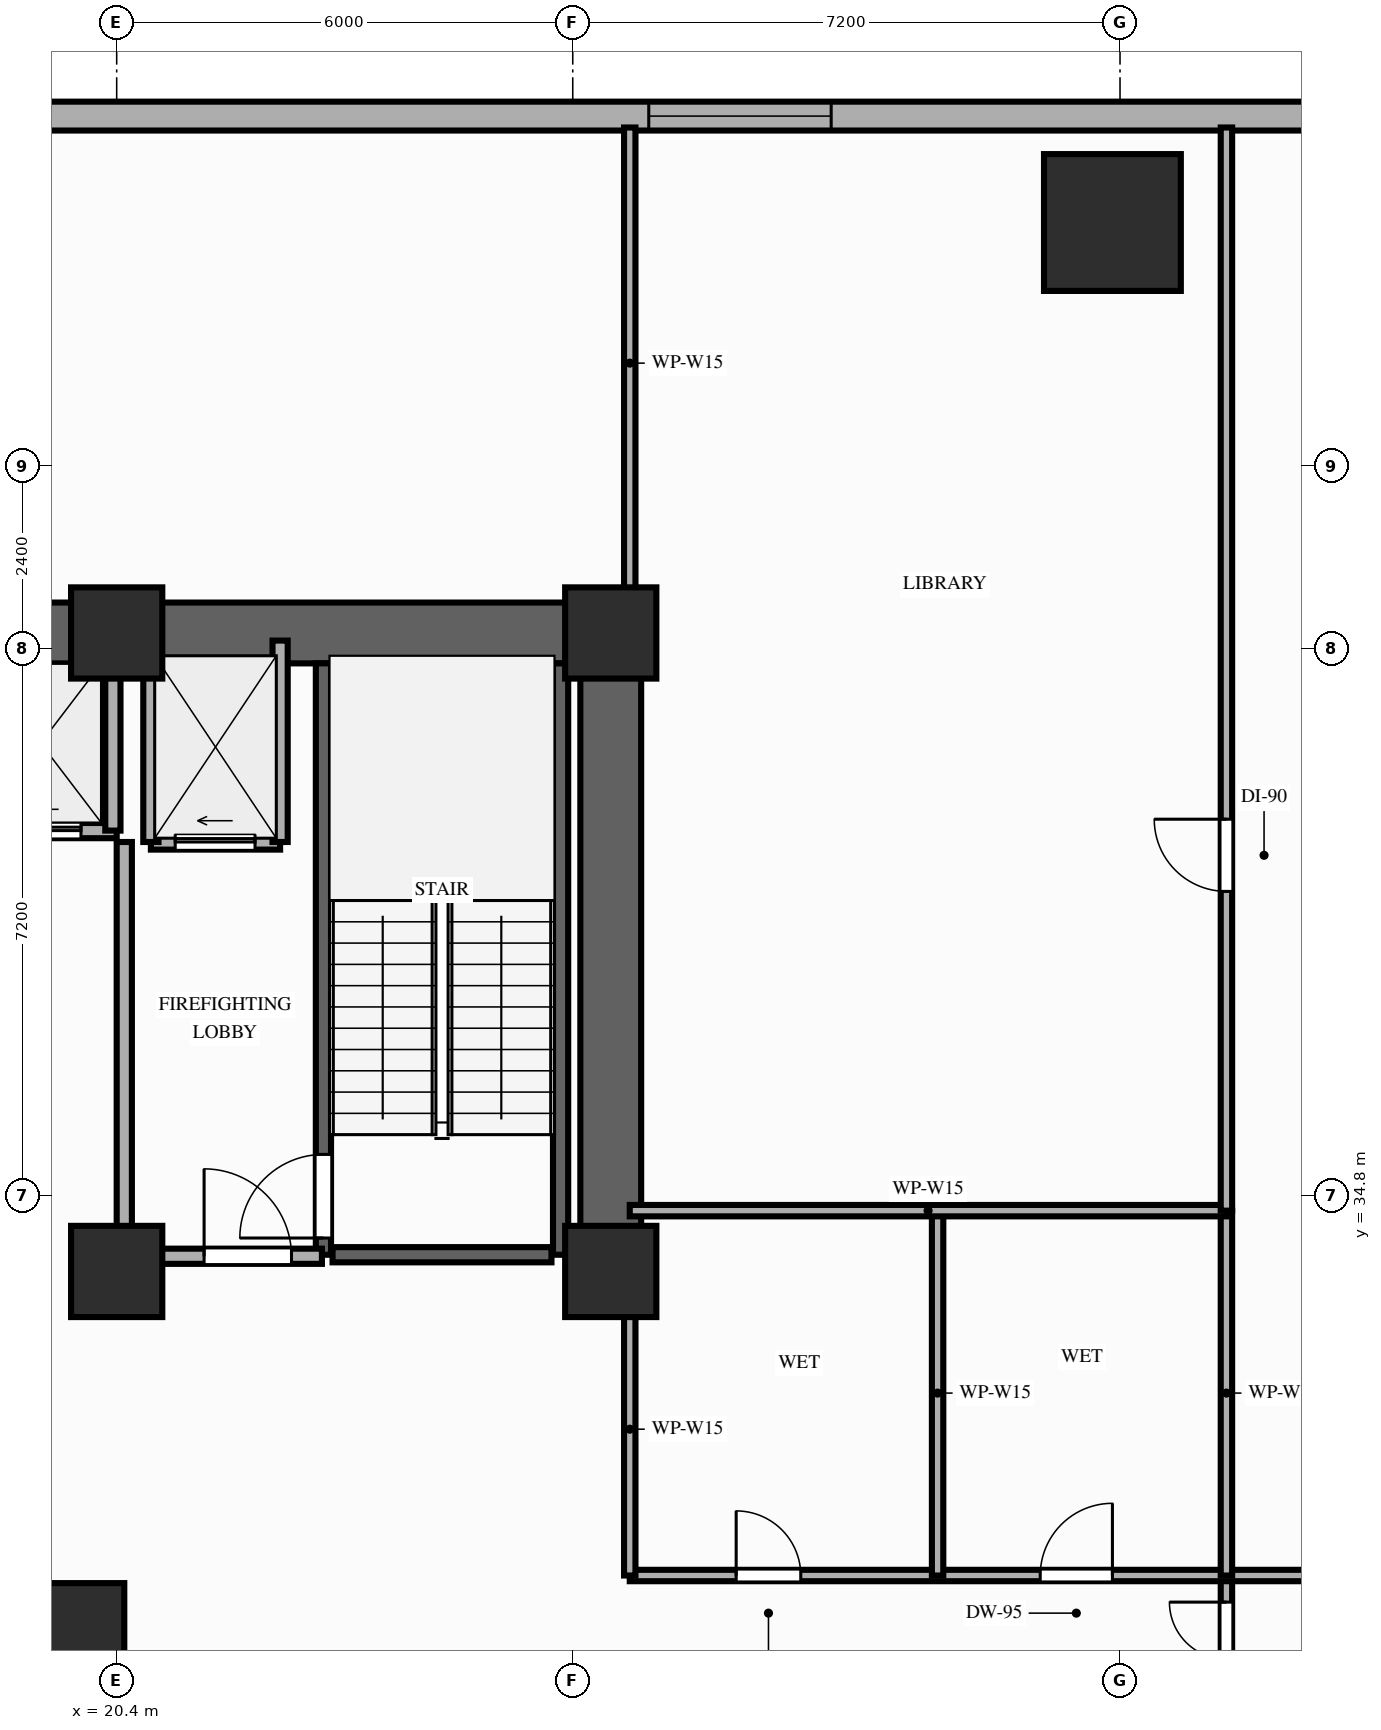
"""IFC4 building model, lengths in metres.
Left out: names, types, materials, properties, quantities, classifications, styles, units other than length and angle.
Written with IfcOpenShell. Run it as: python <this file> out.ifc"""

import sys

from ifc_helpers import new_model, si_unit, direction, frame, frame_2d, origin, origin_2d, place, context, subcontext, project, spatial, rectangle, extrude, element, fill, save


model = new_model("IFC4")
c1 = context("Model", 3, precision=1e-05, world=origin(), true_north=direction((0.0, 1.0)))
c2 = subcontext(c1, "Body", "Model", "MODEL_VIEW")
j1 = project(units=[si_unit("LENGTHUNIT", "METRE"), si_unit("PLANEANGLEUNIT", "RADIAN")], contexts=[c1])
p1 = place(None, origin())
s1 = spatial("IfcSite", under=j1, at=p1, CompositionType="ELEMENT")
p2 = place(p1, origin())
s2 = spatial("IfcBuilding", under=s1, at=p2, CompositionType="ELEMENT")
p3 = place(p2, frame((0.0, 0.0, 4.6)))
s3 = spatial("IfcBuildingStorey", under=s2, at=p3, CompositionType="ELEMENT", Elevation=4.6)
for number, where, z_axis, x_axis in (
    (1, (20.4, 33.8, 0.0), (0.0, 0.0, 1.0), (1.0, 0.0, 0.0)),
    (2, (26.9, 33.8, 0.0), (0.0, 0.0, 1.0), (1.0, 0.0, 0.0)),
    (3, (20.4, 42.2, 0.0), (0.0, 0.0, 1.0), (1.0, 0.0, 0.0)),
    (4, (26.9, 42.2, 0.0), (0.0, 0.0, 1.0), (1.0, 0.0, 0.0)),
):
    element("IfcColumn", number, at=place(p3, frame(where, z_axis=z_axis, x_axis=x_axis)), inside=s3, PredefinedType="COLUMN", context=c2, shape_type="SweptSolid", body=[
        extrude(rectangle(XDim=1.2, YDim=1.2, at=origin_2d()), origin(), (0.0, 0.0, 1.0), 4.2),
    ])
for number, where, z_axis, x_axis in (
    (5, (19.6, 28.8, 0.0), (0.0, 0.0, 1.0), (1.0, 0.0, 0.0)),
    (6, (33.5, 47.6, 0.0), (0.0, 0.0, 1.0), (1.0, 0.0, 0.0)),
):
    element("IfcColumn", number, at=place(p3, frame(where, z_axis=z_axis, x_axis=x_axis)), inside=s3, PredefinedType="COLUMN", context=c2, shape_type="SweptSolid", body=[
        extrude(rectangle(XDim=1.8, YDim=1.8, at=origin_2d()), origin(), (0.0, 0.0, 1.0), 4.2),
    ])
p4 = place(p3, frame((73.2, 49.0, 0.0), z_axis=(0.0, 0.0, 1.0), x_axis=(-1.0, 0.0, 0.0)))
e7 = element("IfcWall", 7, at=p4, inside=s3, PredefinedType="STANDARD", context=c2, shape_type="SweptSolid", body=[
    extrude(rectangle(XDim=69.6, YDim=0.38, at=frame_2d((34.8, 0.0))), origin(), (0.0, 0.0, 1.0), 3.95),
])
p5 = place(p4, frame((3.4, 0.0, 0.9)))
e8 = element("IfcOpeningElement", 8, at=p5, cuts=e7, PredefinedType="OPENING", context=c2, shape_type="SweptSolid", body=[
    extrude(rectangle(XDim=2.4, YDim=2.15, at=frame_2d((1.2, 1.075))), frame((0.0, 0.2, 0.0), z_axis=(0.0, -1.0, 0.0), x_axis=(1.0, 0.0, 0.0)), (0.0, 0.0, 1.0), 0.4),
])
p6 = place(p4, frame((19.2, 0.0, 0.9)))
e9 = element("IfcOpeningElement", 9, at=p6, cuts=e7, PredefinedType="OPENING", context=c2, shape_type="SweptSolid", body=[
    extrude(rectangle(XDim=2.4, YDim=2.15, at=frame_2d((1.2, 1.075))), frame((0.0, 0.2, 0.0), z_axis=(0.0, -1.0, 0.0), x_axis=(1.0, 0.0, 0.0)), (0.0, 0.0, 1.0), 0.4),
])
p7 = place(p4, frame((31.2, 0.0, 0.9)))
e10 = element("IfcOpeningElement", 10, at=p7, cuts=e7, PredefinedType="OPENING", context=c2, shape_type="SweptSolid", body=[
    extrude(rectangle(XDim=2.4, YDim=2.15, at=frame_2d((1.2, 1.075))), frame((0.0, 0.2, 0.0), z_axis=(0.0, -1.0, 0.0), x_axis=(1.0, 0.0, 0.0)), (0.0, 0.0, 1.0), 0.4),
])
p8 = place(p4, frame((43.4, 0.0, 0.9)))
e11 = element("IfcOpeningElement", 11, at=p8, cuts=e7, PredefinedType="OPENING", context=c2, shape_type="SweptSolid", body=[
    extrude(rectangle(XDim=2.4, YDim=2.15, at=frame_2d((1.2, 1.075))), frame((0.0, 0.2, 0.0), z_axis=(0.0, -1.0, 0.0), x_axis=(1.0, 0.0, 0.0)), (0.0, 0.0, 1.0), 0.4),
])
p9 = place(p4, frame((55.6, 0.0, 0.9)))
e12 = element("IfcOpeningElement", 12, at=p9, cuts=e7, PredefinedType="OPENING", context=c2, shape_type="SweptSolid", body=[
    extrude(rectangle(XDim=2.4, YDim=2.15, at=frame_2d((1.2, 1.075))), frame((0.0, 0.2, 0.0), z_axis=(0.0, -1.0, 0.0), x_axis=(1.0, 0.0, 0.0)), (0.0, 0.0, 1.0), 0.4),
])
p10 = place(p3, frame((6.45, 42.2, 0.0), z_axis=(0.0, 0.0, 1.0), x_axis=(1.0, 0.0, 0.0)))
e13 = element("IfcWall", 13, at=p10, inside=s3, PredefinedType="SHEAR", context=c2, shape_type="SweptSolid", body=[
    extrude(rectangle(XDim=20.45, YDim=0.8, at=frame_2d((10.225, 0.0))), origin(), (0.0, 0.0, 1.0), 3.95),
])
p11 = place(p3, frame((26.9, 33.8, 0.0), z_axis=(0.0, 0.0, 1.0), x_axis=(0.0, 1.0, 0.0)))
e14 = element("IfcWall", 14, at=p11, inside=s3, PredefinedType="SHEAR", context=c2, shape_type="SweptSolid", body=[
    extrude(rectangle(XDim=7.95, YDim=0.8, at=frame_2d((3.975, 0.0))), origin(), (0.0, 0.0, 1.0), 3.95),
])
p12 = place(p3, frame((23.12, 34.02, 0.0), z_axis=(0.0, 0.0, 1.0), x_axis=(0.0, 1.0, 0.0)))
e15 = element("IfcWall", 15, at=p12, inside=s3, PredefinedType="SHEAR", context=c2, shape_type="SweptSolid", body=[
    extrude(rectangle(XDim=7.78, YDim=0.2, at=frame_2d((3.89, 0.0))), origin(), (0.0, 0.0, 1.0), 3.95),
])
p13 = place(p12, frame((0.22, 0.0, 0.0)))
e16 = element("IfcOpeningElement", 16, at=p13, cuts=e15, PredefinedType="OPENING", context=c2, shape_type="SweptSolid", body=[
    extrude(rectangle(XDim=1.1, YDim=2.15, at=frame_2d((0.55, 1.075))), frame((0.0, 0.11, 0.0), z_axis=(0.0, -1.0, 0.0), x_axis=(1.0, 0.0, 0.0)), (0.0, 0.0, 1.0), 0.22),
])
p14 = place(p3, frame((26.24, 34.02, 0.0), z_axis=(0.0, 0.0, 1.0), x_axis=(0.0, 1.0, 0.0)))
e17 = element("IfcWall", 17, at=p14, inside=s3, PredefinedType="SHEAR", context=c2, shape_type="SweptSolid", body=[
    extrude(rectangle(XDim=7.78, YDim=0.2, at=frame_2d((3.89, 0.0))), origin(), (0.0, 0.0, 1.0), 3.95),
])
p15 = place(p3, frame((23.24, 34.02, 0.0), z_axis=(0.0, 0.0, 1.0), x_axis=(1.0, 0.0, 0.0)))
e18 = element("IfcWall", 18, at=p15, inside=s3, PredefinedType="SHEAR", context=c2, shape_type="SweptSolid", body=[
    extrude(rectangle(XDim=2.88, YDim=0.2, at=frame_2d((1.44, 0.0))), origin(), (0.0, 0.0, 1.0), 3.95),
])
p16 = place(p3, frame((20.85, 39.45, 0.0), z_axis=(0.0, 0.0, 1.0), x_axis=(1.0, 0.0, 0.0)))
e19 = element("IfcWall", 19, at=p16, inside=s3, PredefinedType="MOVABLE", context=c2, shape_type="SweptSolid", body=[
    extrude(rectangle(XDim=1.7, YDim=0.2, at=frame_2d((0.85, 0.0))), origin(), (0.0, 0.0, 1.0), 3.95),
])
p17 = place(p16, frame((0.32, 0.0, 0.0)))
e20 = element("IfcOpeningElement", 20, at=p17, cuts=e19, PredefinedType="OPENING", context=c2, shape_type="SweptSolid", body=[
    extrude(rectangle(XDim=1.05, YDim=2.15, at=frame_2d((0.525, 1.075))), frame((0.0, 0.11, 0.0), z_axis=(0.0, -1.0, 0.0), x_axis=(1.0, 0.0, 0.0)), (0.0, 0.0, 1.0), 0.22),
])
for number, where, z_axis, x_axis in (
    (21, (20.85, 39.45, 0.0), (0.0, 0.0, 1.0), (0.0, 1.0, 0.0)),
    (22, (22.55, 39.45, 0.0), (0.0, 0.0, 1.0), (0.0, 1.0, 0.0)),
):
    element("IfcWall", number, at=place(p3, frame(where, z_axis=z_axis, x_axis=x_axis)), inside=s3, PredefinedType="MOVABLE", context=c2, shape_type="SweptSolid", body=[
        extrude(rectangle(XDim=2.65, YDim=0.2, at=frame_2d((1.325, 0.0))), origin(), (0.0, 0.0, 1.0), 3.95),
    ])
p18 = place(p3, frame((20.5, 34.0, 0.0), z_axis=(0.0, 0.0, 1.0), x_axis=(0.0, 1.0, 0.0)))
e23 = element("IfcWall", 23, at=p18, inside=s3, PredefinedType="PARTITIONING", context=c2, shape_type="SweptSolid", body=[
    extrude(rectangle(XDim=5.45, YDim=0.2, at=frame_2d((2.725, 0.0))), origin(), (0.0, 0.0, 1.0), 3.23),
])
p19 = place(p3, frame((20.5, 34.0, 0.0), z_axis=(0.0, 0.0, 1.0), x_axis=(1.0, 0.0, 0.0)))
e24 = element("IfcWall", 24, at=p19, inside=s3, PredefinedType="PARTITIONING", context=c2, shape_type="SweptSolid", body=[
    extrude(rectangle(XDim=2.6, YDim=0.2, at=frame_2d((1.3, 0.0))), origin(), (0.0, 0.0, 1.0), 3.23),
])
p20 = place(p19, frame((1.05, 0.0, 0.0)))
e25 = element("IfcOpeningElement", 25, at=p20, cuts=e24, PredefinedType="OPENING", context=c2, shape_type="SweptSolid", body=[
    extrude(rectangle(XDim=1.15, YDim=2.15, at=frame_2d((0.575, 1.075))), frame((0.0, 0.11, 0.0), z_axis=(0.0, -1.0, 0.0), x_axis=(1.0, 0.0, 0.0)), (0.0, 0.0, 1.0), 0.22),
])
p21 = place(p3, frame((13.0, 39.6, 0.0), z_axis=(0.0, 0.0, 1.0), x_axis=(1.0, 0.0, 0.0)))
e26 = element("IfcWall", 26, at=p21, inside=s3, PredefinedType="MOVABLE", context=c2, shape_type="SweptSolid", body=[
    extrude(rectangle(XDim=7.4, YDim=0.2, at=frame_2d((3.7, 0.0))), origin(), (0.0, 0.0, 1.0), 3.95),
])
p22 = place(p21, frame((0.47, 0.0, 0.0)))
e27 = element("IfcOpeningElement", 27, at=p22, cuts=e26, PredefinedType="OPENING", context=c2, shape_type="SweptSolid", body=[
    extrude(rectangle(XDim=1.05, YDim=2.15, at=frame_2d((0.525, 1.075))), frame((0.0, 0.11, 0.0), z_axis=(0.0, -1.0, 0.0), x_axis=(1.0, 0.0, 0.0)), (0.0, 0.0, 1.0), 0.22),
])
p23 = place(p21, frame((2.28, 0.0, 0.0)))
e28 = element("IfcOpeningElement", 28, at=p23, cuts=e26, PredefinedType="OPENING", context=c2, shape_type="SweptSolid", body=[
    extrude(rectangle(XDim=1.05, YDim=2.15, at=frame_2d((0.525, 1.075))), frame((0.0, 0.11, 0.0), z_axis=(0.0, -1.0, 0.0), x_axis=(1.0, 0.0, 0.0)), (0.0, 0.0, 1.0), 0.22),
])
p24 = place(p21, frame((4.08, 0.0, 0.0)))
e29 = element("IfcOpeningElement", 29, at=p24, cuts=e26, PredefinedType="OPENING", context=c2, shape_type="SweptSolid", body=[
    extrude(rectangle(XDim=1.05, YDim=2.15, at=frame_2d((0.525, 1.075))), frame((0.0, 0.11, 0.0), z_axis=(0.0, -1.0, 0.0), x_axis=(1.0, 0.0, 0.0)), (0.0, 0.0, 1.0), 0.22),
])
p25 = place(p21, frame((5.88, 0.0, 0.0)))
e30 = element("IfcOpeningElement", 30, at=p25, cuts=e26, PredefinedType="OPENING", context=c2, shape_type="SweptSolid", body=[
    extrude(rectangle(XDim=1.05, YDim=2.15, at=frame_2d((0.525, 1.075))), frame((0.0, 0.11, 0.0), z_axis=(0.0, -1.0, 0.0), x_axis=(1.0, 0.0, 0.0)), (0.0, 0.0, 1.0), 0.22),
])
p26 = place(p3, frame((20.35, 39.6, 0.0), z_axis=(0.0, 0.0, 1.0), x_axis=(0.0, 1.0, 0.0)))
e31 = element("IfcWall", 31, at=p26, inside=s3, PredefinedType="MOVABLE", context=c2, shape_type="SweptSolid", body=[
    extrude(rectangle(XDim=2.18, YDim=0.2, at=frame_2d((1.09, 0.0))), origin(), (0.0, 0.0, 1.0), 3.95),
])
p27 = place(p3, frame((35.0, 27.6, 0.0), z_axis=(0.0, 0.0, 1.0), x_axis=(0.0, 1.0, 0.0)))
e32 = element("IfcWall", 32, at=p27, inside=s3, PredefinedType="PARTITIONING", context=c2, shape_type="SweptSolid", body=[
    extrude(rectangle(XDim=2.2, YDim=0.15, at=frame_2d((1.1, 0.0))), origin(), (0.0, 0.0, 1.0), 3.23),
])
p28 = place(p27, frame((0.35, 0.0, 0.0)))
e33 = element("IfcOpeningElement", 33, at=p28, cuts=e32, PredefinedType="OPENING", context=c2, shape_type="SweptSolid", body=[
    extrude(rectangle(XDim=1.5, YDim=2.18, at=frame_2d((0.75, 1.09))), frame((0.0, 0.085, 0.0), z_axis=(0.0, -1.0, 0.0), x_axis=(1.0, 0.0, 0.0)), (0.0, 0.0, 1.0), 0.17),
])
p29 = place(p3, frame((27.15, 29.8, 0.0), z_axis=(0.0, 0.0, 1.0), x_axis=(1.0, 0.0, 0.0)))
e34 = element("IfcWall", 34, at=p29, inside=s3, PredefinedType="PARTITIONING", context=c2, shape_type="SweptSolid", body=[
    extrude(rectangle(XDim=35.25, YDim=0.15, at=frame_2d((17.625, 0.0))), origin(), (0.0, 0.0, 1.0), 3.23),
])
p30 = place(p29, frame((25.0, 0.0, 0.0)))
e35 = element("IfcOpeningElement", 35, at=p30, cuts=e34, PredefinedType="OPENING", context=c2, shape_type="SweptSolid", body=[
    extrude(rectangle(XDim=1.0, YDim=2.15, at=frame_2d((0.5, 1.075))), frame((0.0, 0.085, 0.0), z_axis=(0.0, -1.0, 0.0), x_axis=(1.0, 0.0, 0.0)), (0.0, 0.0, 1.0), 0.17),
])
p31 = place(p29, frame((1.4, 0.0, 0.0)))
e36 = element("IfcOpeningElement", 36, at=p31, cuts=e34, PredefinedType="OPENING", context=c2, shape_type="SweptSolid", body=[
    extrude(rectangle(XDim=0.85, YDim=2.1, at=frame_2d((0.425, 1.05))), frame((0.0, 0.085, 0.0), z_axis=(0.0, -1.0, 0.0), x_axis=(1.0, 0.0, 0.0)), (0.0, 0.0, 1.0), 0.17),
])
p32 = place(p29, frame((5.4, 0.0, 0.0)))
e37 = element("IfcOpeningElement", 37, at=p32, cuts=e34, PredefinedType="OPENING", context=c2, shape_type="SweptSolid", body=[
    extrude(rectangle(XDim=0.95, YDim=2.1, at=frame_2d((0.475, 1.05))), frame((0.0, 0.085, 0.0), z_axis=(0.0, -1.0, 0.0), x_axis=(1.0, 0.0, 0.0)), (0.0, 0.0, 1.0), 0.17),
])
p33 = place(p29, frame((12.6, 0.0, 0.0)))
e38 = element("IfcOpeningElement", 38, at=p33, cuts=e34, PredefinedType="OPENING", context=c2, shape_type="SweptSolid", body=[
    extrude(rectangle(XDim=1.0, YDim=2.15, at=frame_2d((0.5, 1.075))), frame((0.0, 0.085, 0.0), z_axis=(0.0, -1.0, 0.0), x_axis=(1.0, 0.0, 0.0)), (0.0, 0.0, 1.0), 0.17),
])
p34 = place(p3, frame((27.15, 29.8, 0.0), z_axis=(0.0, 0.0, 1.0), x_axis=(0.0, 1.0, 0.0)))
e39 = element("IfcWall", 39, at=p34, inside=s3, PredefinedType="PARTITIONING", context=c2, shape_type="SweptSolid", body=[
    extrude(rectangle(XDim=3.85, YDim=0.15, at=frame_2d((1.925, 0.0))), origin(), (0.0, 0.0, 1.0), 3.23),
])
p35 = place(p3, frame((27.15, 42.65, 0.0), z_axis=(0.0, 0.0, 1.0), x_axis=(0.0, 1.0, 0.0)))
e40 = element("IfcWall", 40, at=p35, inside=s3, PredefinedType="PARTITIONING", context=c2, shape_type="SweptSolid", body=[
    extrude(rectangle(XDim=6.2, YDim=0.15, at=frame_2d((3.1, 0.0))), origin(), (0.0, 0.0, 1.0), 3.95),
])
for number, where, z_axis, x_axis in (
    (41, (31.2, 29.8, 0.0), (0.0, 0.0, 1.0), (0.0, 1.0, 0.0)),
    (42, (35.0, 29.8, 0.0), (0.0, 0.0, 1.0), (0.0, 1.0, 0.0)),
):
    element("IfcWall", number, at=place(p3, frame(where, z_axis=z_axis, x_axis=x_axis)), inside=s3, PredefinedType="PARTITIONING", context=c2, shape_type="SweptSolid", body=[
        extrude(rectangle(XDim=4.8, YDim=0.15, at=frame_2d((2.4, 0.0))), origin(), (0.0, 0.0, 1.0), 3.95),
    ])
p36 = place(p3, frame((27.15, 34.6, 0.0), z_axis=(0.0, 0.0, 1.0), x_axis=(1.0, 0.0, 0.0)))
e43 = element("IfcWall", 43, at=p36, inside=s3, PredefinedType="PARTITIONING", context=c2, shape_type="SweptSolid", body=[
    extrude(rectangle(XDim=7.85, YDim=0.15, at=frame_2d((3.925, 0.0))), origin(), (0.0, 0.0, 1.0), 3.23),
])
p37 = place(p3, frame((35.0, 34.6, 0.0), z_axis=(0.0, 0.0, 1.0), x_axis=(0.0, 1.0, 0.0)))
e44 = element("IfcWall", 44, at=p37, inside=s3, PredefinedType="PARTITIONING", context=c2, shape_type="SweptSolid", body=[
    extrude(rectangle(XDim=14.25, YDim=0.15, at=frame_2d((7.125, 0.0))), origin(), (0.0, 0.0, 1.0), 3.23),
])
p38 = place(p37, frame((4.2, 0.0, 0.0)))
e45 = element("IfcOpeningElement", 45, at=p38, cuts=e44, PredefinedType="OPENING", context=c2, shape_type="SweptSolid", body=[
    extrude(rectangle(XDim=0.95, YDim=2.15, at=frame_2d((0.475, 1.075))), frame((0.0, 0.085, 0.0), z_axis=(0.0, -1.0, 0.0), x_axis=(1.0, 0.0, 0.0)), (0.0, 0.0, 1.0), 0.17),
])
p39 = place(p8, origin())
e46 = element("IfcWindow", 46, at=p39, inside=s3, PartitioningType="SINGLE_PANEL", PredefinedType="WINDOW", context=c2, shape_type="SweptSolid", body=[
    extrude(rectangle(XDim=2.4, YDim=2.15, at=frame_2d((1.2, 1.075))), frame((0.0, 0.03, 0.0), z_axis=(0.0, -1.0, 0.0), x_axis=(1.0, 0.0, 0.0)), (0.0, 0.0, 1.0), 0.06),
])
fill(e11, e46)
p40 = place(p13, origin())
e47 = element("IfcDoor", 47, at=p40, inside=s3, OperationType="SINGLE_SWING_LEFT", PredefinedType="DOOR", context=c2, shape_type="SweptSolid", body=[
    extrude(rectangle(XDim=1.1, YDim=2.15, at=frame_2d((0.55, 1.075))), frame((0.0, 0.025, 0.0), z_axis=(0.0, -1.0, 0.0), x_axis=(1.0, 0.0, 0.0)), (0.0, 0.0, 1.0), 0.05),
])
fill(e16, e47)
p41 = place(p17, origin())
e48 = element("IfcDoor", 48, at=p41, inside=s3, OperationType="SLIDING_TO_LEFT", PredefinedType="DOOR", context=c2, shape_type="SweptSolid", body=[
    extrude(rectangle(XDim=1.05, YDim=2.15, at=frame_2d((0.525, 1.075))), frame((0.0, 0.025, 0.0), z_axis=(0.0, -1.0, 0.0), x_axis=(1.0, 0.0, 0.0)), (0.0, 0.0, 1.0), 0.05),
])
fill(e20, e48)
p42 = place(p20, origin())
e49 = element("IfcDoor", 49, at=p42, inside=s3, OperationType="SINGLE_SWING_LEFT", PredefinedType="DOOR", context=c2, shape_type="SweptSolid", body=[
    extrude(rectangle(XDim=1.15, YDim=2.15, at=frame_2d((0.575, 1.075))), frame((0.0, 0.025, 0.0), z_axis=(0.0, -1.0, 0.0), x_axis=(1.0, 0.0, 0.0)), (0.0, 0.0, 1.0), 0.05),
])
fill(e25, e49)
p43 = place(p25, origin())
e50 = element("IfcDoor", 50, at=p43, inside=s3, OperationType="SLIDING_TO_LEFT", PredefinedType="DOOR", context=c2, shape_type="SweptSolid", body=[
    extrude(rectangle(XDim=1.05, YDim=2.15, at=frame_2d((0.525, 1.075))), frame((0.0, 0.025, 0.0), z_axis=(0.0, -1.0, 0.0), x_axis=(1.0, 0.0, 0.0)), (0.0, 0.0, 1.0), 0.05),
])
fill(e30, e50)
p44 = place(p28, origin())
e51 = element("IfcDoor", 51, at=p44, inside=s3, OperationType="DOUBLE_DOOR_SINGLE_SWING", PredefinedType="DOOR", context=c2, shape_type="SweptSolid", body=[
    extrude(rectangle(XDim=1.5, YDim=2.18, at=frame_2d((0.75, 1.09))), frame((0.0, 0.025, 0.0), z_axis=(0.0, -1.0, 0.0), x_axis=(1.0, 0.0, 0.0)), (0.0, 0.0, 1.0), 0.05),
])
fill(e33, e51)
p45 = place(p31, origin())
e52 = element("IfcDoor", 52, at=p45, inside=s3, OperationType="SINGLE_SWING_LEFT", PredefinedType="DOOR", context=c2, shape_type="SweptSolid", body=[
    extrude(rectangle(XDim=0.85, YDim=2.1, at=frame_2d((0.425, 1.05))), frame((0.0, 0.025, 0.0), z_axis=(0.0, -1.0, 0.0), x_axis=(1.0, 0.0, 0.0)), (0.0, 0.0, 1.0), 0.05),
])
fill(e36, e52)
p46 = place(p32, origin())
e53 = element("IfcDoor", 53, at=p46, inside=s3, OperationType="SINGLE_SWING_RIGHT", PredefinedType="DOOR", context=c2, shape_type="SweptSolid", body=[
    extrude(rectangle(XDim=0.95, YDim=2.1, at=frame_2d((0.475, 1.05))), frame((0.0, 0.025, 0.0), z_axis=(0.0, -1.0, 0.0), x_axis=(1.0, 0.0, 0.0)), (0.0, 0.0, 1.0), 0.05),
])
fill(e37, e53)
p47 = place(p38, origin())
e54 = element("IfcDoor", 54, at=p47, inside=s3, OperationType="SINGLE_SWING_RIGHT", PredefinedType="DOOR", context=c2, shape_type="SweptSolid", body=[
    extrude(rectangle(XDim=0.95, YDim=2.15, at=frame_2d((0.475, 1.075))), frame((0.0, 0.025, 0.0), z_axis=(0.0, -1.0, 0.0), x_axis=(1.0, 0.0, 0.0)), (0.0, 0.0, 1.0), 0.05),
])
fill(e45, e54)
save(model, sys.argv[1])
